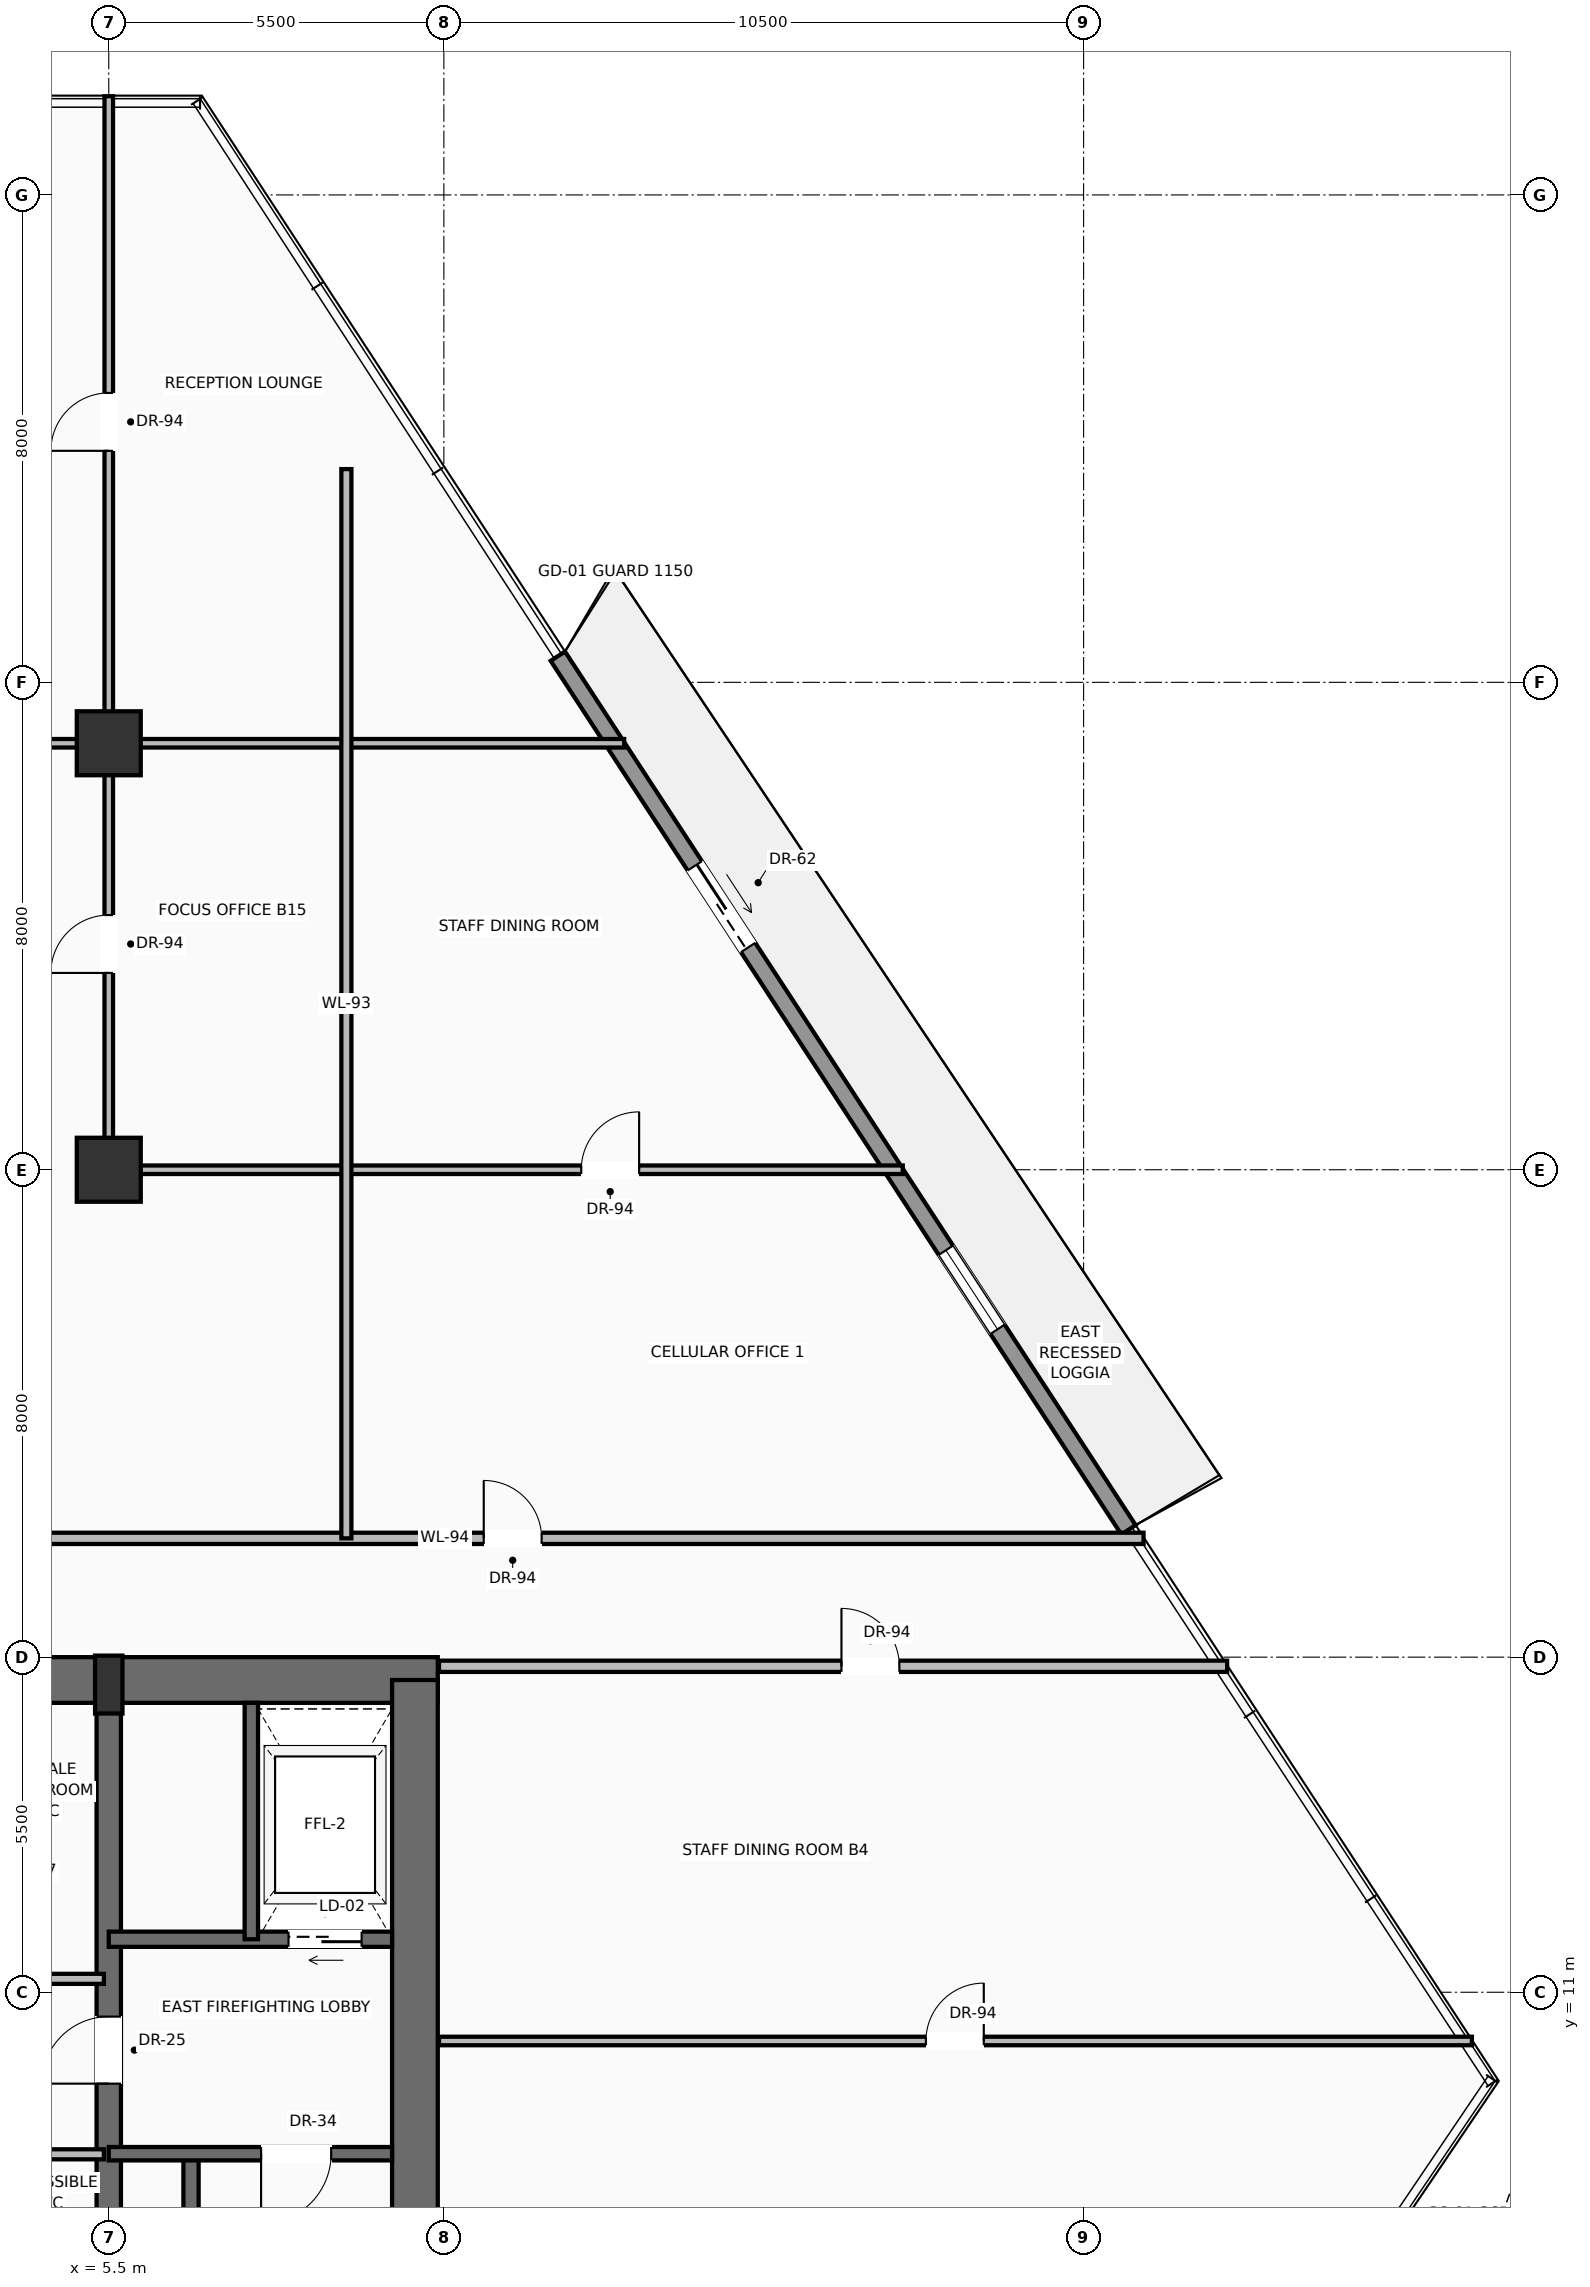
"""IFC4 building model, lengths in metres.
Left out: names, types, materials, properties, quantities, classifications, styles, units other than length and angle.
Written with IfcOpenShell. Run it as: python <this file> out.ifc"""

import sys

from ifc_helpers import new_model, si_unit, direction, frame, frame_2d, origin, origin_2d, place, context, subcontext, project, spatial, rectangle, extrude, source, transform, mapped, element, fill, save


model = new_model("IFC4")
c1 = context("Model", 3, precision=1e-05, world=origin(), true_north=direction((0.0, 1.0)))
c2 = subcontext(c1, "Body", "Model", "MODEL_VIEW")
j1 = project(units=[si_unit("LENGTHUNIT", "METRE"), si_unit("PLANEANGLEUNIT", "RADIAN")], contexts=[c1])
p1 = place(None, origin())
s1 = spatial("IfcSite", under=j1, at=p1, CompositionType="ELEMENT")
p2 = place(p1, origin())
s2 = spatial("IfcBuilding", under=s1, at=p2, CompositionType="ELEMENT")
p3 = place(p2, frame((0.0, 0.0, 80.3)))
s3 = spatial("IfcBuildingStorey", under=s2, at=p3, CompositionType="ELEMENT", Elevation=80.3)
p4 = place(p3, frame((-10.9, 16.125, 0.0), z_axis=(0.0, 0.0, 1.0), x_axis=(1.0, 0.0, 0.0)))
e1 = element("IfcWall", 1, at=p4, inside=s3, PredefinedType="SHEAR", context=c2, shape_type="SweptSolid", body=[
    extrude(rectangle(XDim=21.8, YDim=0.75, at=frame_2d((10.9, 0.0))), origin(), (0.0, 0.0, 1.0), 3.45),
])
p5 = place(p4, frame((3.47, 0.0, 0.0)))
e2 = element("IfcOpeningElement", 2, at=p5, cuts=e1, PredefinedType="OPENING", context=c2, shape_type="SweptSolid", body=[
    extrude(rectangle(XDim=1.3, YDim=2.3, at=frame_2d((0.65, 1.15))), frame((0.0, 0.385, 0.0), z_axis=(0.0, -1.0, 0.0), x_axis=(1.0, 0.0, 0.0)), (0.0, 0.0, 1.0), 0.77),
])
p6 = place(p4, frame((9.9, 0.0, 0.0)))
e3 = element("IfcOpeningElement", 3, at=p6, cuts=e1, PredefinedType="OPENING", context=c2, shape_type="SweptSolid", body=[
    extrude(rectangle(XDim=2.0, YDim=2.4, at=frame_2d((1.0, 1.2))), frame((0.0, 0.385, 0.0), z_axis=(0.0, -1.0, 0.0), x_axis=(1.0, 0.0, 0.0)), (0.0, 0.0, 1.0), 0.77),
])
p7 = place(p3, frame((10.525, 0.475, 0.0), z_axis=(0.0, 0.0, 1.0), x_axis=(0.0, 1.0, 0.0)))
e4 = element("IfcWall", 4, at=p7, inside=s3, PredefinedType="SHEAR", context=c2, shape_type="SweptSolid", body=[
    extrude(rectangle(XDim=15.65, YDim=0.75, at=frame_2d((7.825, 0.0))), origin(), (0.0, 0.0, 1.0), 3.45),
])
p8 = place(p3, frame((5.5, 0.475, 0.0), z_axis=(0.0, 0.0, 1.0), x_axis=(0.0, 1.0, 0.0)))
e5 = element("IfcWall", 5, at=p8, inside=s3, PredefinedType="SHEAR", context=c2, shape_type="SweptSolid", body=[
    extrude(rectangle(XDim=15.65, YDim=0.4, at=frame_2d((7.825, 0.0))), origin(), (0.0, 0.0, 1.0), 3.45),
])
p9 = place(p8, frame((9.025, 0.0, 0.0)))
e6 = element("IfcOpeningElement", 6, at=p9, cuts=e5, PredefinedType="OPENING", context=c2, shape_type="SweptSolid", body=[
    extrude(rectangle(XDim=1.1, YDim=2.2, at=frame_2d((0.55, 1.1))), frame((0.0, 0.21, 0.0), z_axis=(0.0, -1.0, 0.0), x_axis=(1.0, 0.0, 0.0)), (0.0, 0.0, 1.0), 0.42),
])
m1 = source(origin(), c2, "Body", "SweptSolid", [
    extrude(rectangle(XDim=0.45, YDim=0.95, at=origin_2d()), origin(), (0.0, 0.0, 1.0), 3.7),
])
p10 = place(p3, frame((5.5, 16.05, 0.0), z_axis=(0.0, 0.0, 1.0), x_axis=(1.0, 0.0, 0.0)))
e7 = element("IfcColumn", 7, at=p10, inside=s3, PredefinedType="PILASTER", context=c2, shape_type="MappedRepresentation", body=[
    mapped(m1, transform((0.0, 0.0, 0.0), scale=1.0)),
])
m2 = source(origin(), c2, "Body", "SweptSolid", [
    extrude(rectangle(XDim=1.05, YDim=1.05, at=origin_2d()), origin(), (0.0, 0.0, 1.0), 3.7),
])
for number, where, z_axis, x_axis in (
    (8, (5.5, 24.5, 0.0), (0.0, 0.0, 1.0), (1.0, 0.0, 0.0)),
    (9, (5.5, 31.5, 0.0), (0.0, 0.0, 1.0), (1.0, 0.0, 0.0)),
):
    element("IfcColumn", number, at=place(p3, frame(where, z_axis=z_axis, x_axis=x_axis)), inside=s3, PredefinedType="COLUMN", context=c2, shape_type="MappedRepresentation", body=[
        mapped(m2, transform((0.0, 0.0, 0.0), scale=1.0)),
    ])
p11 = place(p3, frame((12.871, 32.929, 0.0), z_axis=(0.0, 0.0, 1.0), x_axis=(0.546875982242, -0.83721362868, 0.0)))
e10 = element("IfcWall", 10, at=p11, inside=s3, PredefinedType="SOLIDWALL", context=c2, shape_type="SweptSolid", body=[
    extrude(rectangle(XDim=17.126, YDim=0.28, at=frame_2d((8.563, 0.0))), origin(), (0.0, 0.0, 1.0), 3.03),
])
p12 = place(p11, frame((4.11, 0.0, 0.0)))
e11 = element("IfcOpeningElement", 11, at=p12, cuts=e10, PredefinedType="OPENING", context=c2, shape_type="SweptSolid", body=[
    extrude(rectangle(XDim=1.6, YDim=2.35, at=frame_2d((0.8, 1.175))), frame((0.0, 0.15, 0.0), z_axis=(0.0, -1.0, 0.0), x_axis=(1.0, 0.0, 0.0)), (0.0, 0.0, 1.0), 0.3),
])
p13 = place(p11, frame((11.646, 0.0, 0.9)))
e12 = element("IfcOpeningElement", 12, at=p13, cuts=e10, PredefinedType="OPENING", context=c2, shape_type="SweptSolid", body=[
    extrude(rectangle(XDim=1.55, YDim=1.85, at=frame_2d((0.775, 0.925))), frame((0.0, 0.15, 0.0), z_axis=(0.0, -1.0, 0.0), x_axis=(1.0, 0.0, 0.0)), (0.0, 0.0, 1.0), 0.3),
])
p14 = place(p3, frame((6.85, 0.85, 0.0), z_axis=(0.0, 0.0, 1.0), x_axis=(0.0, 1.0, 0.0)))
e13 = element("IfcWall", 13, at=p14, inside=s3, PredefinedType="SOLIDWALL", context=c2, shape_type="SweptSolid", body=[
    extrude(rectangle(XDim=7.5, YDim=0.25, at=frame_2d((3.75, 0.0))), origin(), (0.0, 0.0, 1.0), 3.45),
])
p15 = place(p3, frame((10.15, 8.35, 0.0), z_axis=(0.0, 0.0, 1.0), x_axis=(-1.0, 0.0, 0.0)))
e14 = element("IfcWall", 14, at=p15, inside=s3, PredefinedType="SOLIDWALL", context=c2, shape_type="SweptSolid", body=[
    extrude(rectangle(XDim=4.65, YDim=0.22, at=frame_2d((2.325, 0.0))), origin(), (0.0, 0.0, 1.0), 3.45),
])
p16 = place(p15, frame((1.0, 0.0, 0.0)))
e15 = element("IfcOpeningElement", 15, at=p16, cuts=e14, PredefinedType="OPENING", context=c2, shape_type="SweptSolid", body=[
    extrude(rectangle(XDim=1.15, YDim=2.2, at=frame_2d((0.575, 1.1))), frame((0.0, 0.12, 0.0), z_axis=(0.0, -1.0, 0.0), x_axis=(1.0, 0.0, 0.0)), (0.0, 0.0, 1.0), 0.24),
])
p17 = place(p3, frame((10.15, 11.87, 0.0), z_axis=(0.0, 0.0, 1.0), x_axis=(-1.0, 0.0, 0.0)))
e16 = element("IfcWall", 16, at=p17, inside=s3, PredefinedType="SOLIDWALL", context=c2, shape_type="SweptSolid", body=[
    extrude(rectangle(XDim=4.65, YDim=0.25, at=frame_2d((2.325, 0.0))), origin(), (0.0, 0.0, 1.0), 3.45),
])
p18 = place(p17, frame((0.5, 0.0, 0.0)))
e17 = element("IfcOpeningElement", 17, at=p18, cuts=e16, PredefinedType="OPENING", context=c2, shape_type="SweptSolid", body=[
    extrude(rectangle(XDim=1.2, YDim=2.25, at=frame_2d((0.6, 1.125))), frame((0.0, 0.135, 0.0), z_axis=(0.0, -1.0, 0.0), x_axis=(1.0, 0.0, 0.0)), (0.0, 0.0, 1.0), 0.27),
])
p19 = place(p3, frame((7.84, 11.87, 0.0), z_axis=(0.0, 0.0, 1.0), x_axis=(0.0, 1.0, 0.0)))
e18 = element("IfcWall", 18, at=p19, inside=s3, PredefinedType="SOLIDWALL", context=c2, shape_type="SweptSolid", body=[
    extrude(rectangle(XDim=3.88, YDim=0.22, at=frame_2d((1.94, 0.0))), origin(), (0.0, 0.0, 1.0), 3.45),
])
for number, where, z_axis, x_axis in (
    (19, (3.54, 8.34, 0.0), (0.0, 0.0, 1.0), (1.0, 0.0, 0.0)),
    (20, (3.54, 11.22, 0.0), (0.0, 0.0, 1.0), (1.0, 0.0, 0.0)),
):
    element("IfcWall", number, at=place(p3, frame(where, z_axis=z_axis, x_axis=x_axis)), inside=s3, PredefinedType="PARTITIONING", context=c2, shape_type="SweptSolid", body=[
        extrude(rectangle(XDim=1.88, YDim=0.165, at=frame_2d((0.94, 0.0))), origin(), (0.0, 0.0, 1.0), 3.442),
    ])
p20 = place(p3, frame((10.92, 16.35, 0.0), z_axis=(0.0, 0.0, 1.0), x_axis=(1.0, 0.0, 0.0)))
e21 = element("IfcWall", 21, at=p20, inside=s3, PredefinedType="PARTITIONING", context=c2, shape_type="SweptSolid", body=[
    extrude(rectangle(XDim=12.936, YDim=0.185, at=frame_2d((6.468, 0.0))), origin(), (0.0, 0.0, 1.0), 2.747),
])
p21 = place(p20, frame((6.606, 0.0, 0.0)))
e22 = element("IfcOpeningElement", 22, at=p21, cuts=e21, PredefinedType="OPENING", context=c2, shape_type="SweptSolid", body=[
    extrude(rectangle(XDim=0.95, YDim=2.2, at=frame_2d((0.475, 1.1))), frame((0.0, 0.103, 0.0), z_axis=(0.0, -1.0, 0.0), x_axis=(1.0, 0.0, 0.0)), (0.0, 0.0, 1.0), 0.205),
])
p22 = place(p3, frame((-0.45, 18.45, 0.0), z_axis=(0.0, 0.0, 1.0), x_axis=(1.0, 0.0, 0.0)))
e23 = element("IfcWall", 23, at=p22, inside=s3, PredefinedType="PARTITIONING", context=c2, shape_type="SweptSolid", body=[
    extrude(rectangle(XDim=22.934, YDim=0.185, at=frame_2d((11.467, 0.0))), origin(), (0.0, 0.0, 1.0), 2.747),
])
p23 = place(p22, frame((12.104, 0.0, 0.0)))
e24 = element("IfcOpeningElement", 24, at=p23, cuts=e23, PredefinedType="OPENING", context=c2, shape_type="SweptSolid", body=[
    extrude(rectangle(XDim=0.95, YDim=2.2, at=frame_2d((0.475, 1.1))), frame((0.0, 0.103, 0.0), z_axis=(0.0, -1.0, 0.0), x_axis=(1.0, 0.0, 0.0)), (0.0, 0.0, 1.0), 0.205),
])
p24 = place(p3, frame((5.5, 24.5, 0.0), z_axis=(0.0, 0.0, 1.0), x_axis=(0.0, 1.0, 0.0)))
e25 = element("IfcWall", 25, at=p24, inside=s3, PredefinedType="PARTITIONING", context=c2, shape_type="SweptSolid", body=[
    extrude(rectangle(XDim=17.62, YDim=0.14, at=frame_2d((8.81, 0.0))), origin(), (0.0, 0.0, 1.0), 2.747),
])
p25 = place(p24, frame((3.23, 0.0, 0.0)))
e26 = element("IfcOpeningElement", 26, at=p25, cuts=e25, PredefinedType="OPENING", context=c2, shape_type="SweptSolid", body=[
    extrude(rectangle(XDim=0.95, YDim=2.2, at=frame_2d((0.475, 1.1))), frame((0.0, 0.08, 0.0), z_axis=(0.0, -1.0, 0.0), x_axis=(1.0, 0.0, 0.0)), (0.0, 0.0, 1.0), 0.16),
])
p26 = place(p24, frame((11.8, 0.0, 0.0)))
e27 = element("IfcOpeningElement", 27, at=p26, cuts=e25, PredefinedType="OPENING", context=c2, shape_type="SweptSolid", body=[
    extrude(rectangle(XDim=0.95, YDim=2.2, at=frame_2d((0.475, 1.1))), frame((0.0, 0.08, 0.0), z_axis=(0.0, -1.0, 0.0), x_axis=(1.0, 0.0, 0.0)), (0.0, 0.0, 1.0), 0.16),
])
p27 = place(p3, frame((5.5, 24.5, 0.0), z_axis=(0.0, 0.0, 1.0), x_axis=(1.0, 0.0, 0.0)))
e28 = element("IfcWall", 28, at=p27, inside=s3, PredefinedType="PARTITIONING", context=c2, shape_type="SweptSolid", body=[
    extrude(rectangle(XDim=13.032, YDim=0.14, at=frame_2d((6.516, 0.0))), origin(), (0.0, 0.0, 1.0), 2.747),
])
p28 = place(p27, frame((7.755, 0.0, 0.0)))
e29 = element("IfcOpeningElement", 29, at=p28, cuts=e28, PredefinedType="OPENING", context=c2, shape_type="SweptSolid", body=[
    extrude(rectangle(XDim=0.95, YDim=2.2, at=frame_2d((0.475, 1.1))), frame((0.0, 0.08, 0.0), z_axis=(0.0, -1.0, 0.0), x_axis=(1.0, 0.0, 0.0)), (0.0, 0.0, 1.0), 0.16),
])
p29 = place(p3, frame((-0.45, 31.5, 0.0), z_axis=(0.0, 0.0, 1.0), x_axis=(1.0, 0.0, 0.0)))
e30 = element("IfcWall", 30, at=p29, inside=s3, PredefinedType="PARTITIONING", context=c2, shape_type="SweptSolid", body=[
    extrude(rectangle(XDim=14.409, YDim=0.14, at=frame_2d((7.205, 0.0))), origin(), (0.0, 0.0, 1.0), 2.747),
])
p30 = place(p3, frame((9.4, 18.45, 0.0), z_axis=(0.0, 0.0, 1.0), x_axis=(0.0, 1.0, 0.0)))
e31 = element("IfcWall", 31, at=p30, inside=s3, PredefinedType="PARTITIONING", context=c2, shape_type="SweptSolid", body=[
    extrude(rectangle(XDim=17.55, YDim=0.165, at=frame_2d((8.775, 0.0))), origin(), (0.0, 0.0, 1.0), 2.747),
])
p31 = place(p3, frame((10.92, 10.2, 0.0), z_axis=(0.0, 0.0, 1.0), x_axis=(1.0, 0.0, 0.0)))
e32 = element("IfcWall", 32, at=p31, inside=s3, PredefinedType="PARTITIONING", context=c2, shape_type="SweptSolid", body=[
    extrude(rectangle(XDim=16.953, YDim=0.14, at=frame_2d((8.477, 0.0))), origin(), (0.0, 0.0, 1.0), 3.442),
])
p32 = place(p31, frame((7.992, 0.0, 0.0)))
e33 = element("IfcOpeningElement", 33, at=p32, cuts=e32, PredefinedType="OPENING", context=c2, shape_type="SweptSolid", body=[
    extrude(rectangle(XDim=0.95, YDim=2.2, at=frame_2d((0.475, 1.1))), frame((0.0, 0.08, 0.0), z_axis=(0.0, -1.0, 0.0), x_axis=(1.0, 0.0, 0.0)), (0.0, 0.0, 1.0), 0.16),
])
m3 = source(origin(), c2, "Body", "SweptSolid", [
    extrude(rectangle(XDim=1.6, YDim=2.35, at=frame_2d((0.8, 1.175))), frame((0.0, 0.025, 0.0), z_axis=(0.0, -1.0, 0.0), x_axis=(1.0, 0.0, 0.0)), (0.0, 0.0, 1.0), 0.05),
])
p33 = place(p12, origin())
e34 = element("IfcDoor", 34, at=p33, inside=s3, OperationType="SLIDING_TO_RIGHT", PredefinedType="DOOR", context=c2, shape_type="MappedRepresentation", body=[
    mapped(m3, transform((0.0, 0.0, 0.0), scale=1.0)),
])
fill(e11, e34)
m4 = source(origin(), c2, "Body", "SweptSolid", [
    extrude(rectangle(XDim=1.55, YDim=1.85, at=frame_2d((0.775, 0.925))), frame((0.0, 0.03, 0.0), z_axis=(0.0, -1.0, 0.0), x_axis=(1.0, 0.0, 0.0)), (0.0, 0.0, 1.0), 0.06),
])
p34 = place(p13, origin())
e35 = element("IfcWindow", 35, at=p34, inside=s3, PartitioningType="SINGLE_PANEL", PredefinedType="WINDOW", context=c2, shape_type="MappedRepresentation", body=[
    mapped(m4, transform((0.0, 0.0, 0.0), scale=1.0)),
])
fill(e12, e35)
m5 = source(origin(), c2, "Body", "SweptSolid", [
    extrude(rectangle(XDim=1.15, YDim=2.2, at=frame_2d((0.575, 1.1))), frame((0.0, 0.025, 0.0), z_axis=(0.0, -1.0, 0.0), x_axis=(1.0, 0.0, 0.0)), (0.0, 0.0, 1.0), 0.05),
])
p35 = place(p16, origin())
e36 = element("IfcDoor", 36, at=p35, inside=s3, OperationType="SINGLE_SWING_RIGHT", PredefinedType="DOOR", context=c2, shape_type="MappedRepresentation", body=[
    mapped(m5, transform((0.0, 0.0, 0.0), scale=1.0)),
])
fill(e15, e36)
m6 = source(origin(), c2, "Body", "SweptSolid", [
    extrude(rectangle(XDim=1.1, YDim=2.2, at=frame_2d((0.55, 1.1))), frame((0.0, 0.025, 0.0), z_axis=(0.0, -1.0, 0.0), x_axis=(1.0, 0.0, 0.0)), (0.0, 0.0, 1.0), 0.05),
])
p36 = place(p9, origin())
e37 = element("IfcDoor", 37, at=p36, inside=s3, OperationType="SINGLE_SWING_LEFT", PredefinedType="DOOR", context=c2, shape_type="MappedRepresentation", body=[
    mapped(m6, transform((0.0, 0.0, 0.0), scale=1.0)),
])
fill(e6, e37)
m7 = source(origin(), c2, "Body", "SweptSolid", [
    extrude(rectangle(XDim=1.2, YDim=2.25, at=frame_2d((0.6, 1.125))), frame((0.0, 0.025, 0.0), z_axis=(0.0, -1.0, 0.0), x_axis=(1.0, 0.0, 0.0)), (0.0, 0.0, 1.0), 0.05),
])
p37 = place(p18, origin())
e38 = element("IfcDoor", 38, at=p37, inside=s3, OperationType="SLIDING_TO_RIGHT", PredefinedType="DOOR", context=c2, shape_type="MappedRepresentation", body=[
    mapped(m7, transform((0.0, 0.0, 0.0), scale=1.0)),
])
fill(e17, e38)
m8 = source(origin(), c2, "Body", "SweptSolid", [
    extrude(rectangle(XDim=0.95, YDim=2.2, at=frame_2d((0.475, 1.1))), frame((0.0, 0.025, 0.0), z_axis=(0.0, -1.0, 0.0), x_axis=(1.0, 0.0, 0.0)), (0.0, 0.0, 1.0), 0.05),
])
p38 = place(p21, origin())
e39 = element("IfcDoor", 39, at=p38, inside=s3, OperationType="SINGLE_SWING_LEFT", PredefinedType="DOOR", context=c2, shape_type="MappedRepresentation", body=[
    mapped(m8, transform((0.0, 0.0, 0.0), scale=1.0)),
])
fill(e22, e39)
p39 = place(p23, origin())
e40 = element("IfcDoor", 40, at=p39, inside=s3, OperationType="SINGLE_SWING_LEFT", PredefinedType="DOOR", context=c2, shape_type="MappedRepresentation", body=[
    mapped(m8, transform((0.0, 0.0, 0.0), scale=1.0)),
])
fill(e24, e40)
p40 = place(p32, origin())
e41 = element("IfcDoor", 41, at=p40, inside=s3, OperationType="SINGLE_SWING_RIGHT", PredefinedType="DOOR", context=c2, shape_type="MappedRepresentation", body=[
    mapped(m8, transform((0.0, 0.0, 0.0), scale=1.0)),
])
fill(e33, e41)
p41 = place(p28, origin())
e42 = element("IfcDoor", 42, at=p41, inside=s3, OperationType="SINGLE_SWING_RIGHT", PredefinedType="DOOR", context=c2, shape_type="MappedRepresentation", body=[
    mapped(m8, transform((0.0, 0.0, 0.0), scale=1.0)),
])
fill(e29, e42)
p42 = place(p25, origin())
e43 = element("IfcDoor", 43, at=p42, inside=s3, OperationType="SINGLE_SWING_LEFT", PredefinedType="DOOR", context=c2, shape_type="MappedRepresentation", body=[
    mapped(m8, transform((0.0, 0.0, 0.0), scale=1.0)),
])
fill(e26, e43)
p43 = place(p26, origin())
e44 = element("IfcDoor", 44, at=p43, inside=s3, OperationType="SINGLE_SWING_LEFT", PredefinedType="DOOR", context=c2, shape_type="MappedRepresentation", body=[
    mapped(m8, transform((0.0, 0.0, 0.0), scale=1.0)),
])
fill(e27, e44)
save(model, sys.argv[1])
